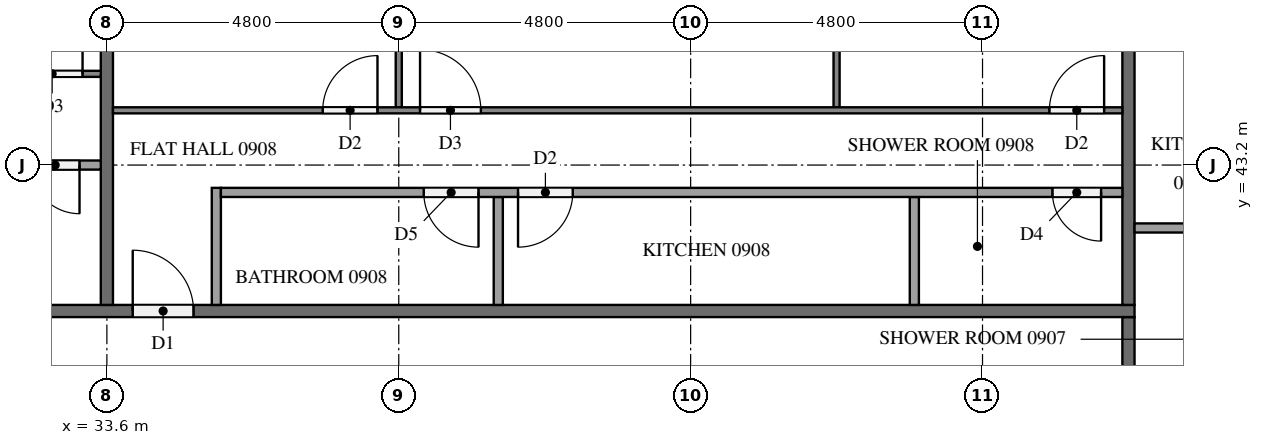
"""IFC4 building model, lengths in metres.
Left out: names, types, materials, properties, quantities, classifications, styles, units other than length and angle.
Written with IfcOpenShell. Run it as: python <this file> out.ifc"""

import sys

from ifc_helpers import new_model, si_unit, direction, frame, frame_2d, origin, place, context, subcontext, project, spatial, rectangle, extrude, element, fill, save


model = new_model("IFC4")
c1 = context("Model", 3, precision=1e-05, world=origin(), true_north=direction((0.0, 1.0)))
c2 = subcontext(c1, "Body", "Model", "MODEL_VIEW")
j1 = project(units=[si_unit("LENGTHUNIT", "METRE"), si_unit("PLANEANGLEUNIT", "RADIAN")], contexts=[c1])
p1 = place(None, origin())
s1 = spatial("IfcSite", under=j1, at=p1, CompositionType="ELEMENT")
p2 = place(p1, origin())
s2 = spatial("IfcBuilding", under=s1, at=p2, CompositionType="ELEMENT")
p3 = place(p2, frame((0.0, 0.0, 39.9)))
s3 = spatial("IfcBuildingStorey", under=s2, at=p3, CompositionType="ELEMENT", Elevation=39.9)
p4 = place(p3, frame((50.4, 40.7, 0.0), z_axis=(0.0, 0.0, 1.0), x_axis=(0.0, -1.0, 0.0)))
e1 = element("IfcWall", 1, at=p4, inside=s3, PredefinedType="PARTITIONING", context=c2, shape_type="SweptSolid", body=[
    extrude(rectangle(XDim=28.6, YDim=0.2, at=frame_2d((14.3, 0.0))), origin(), (0.0, 0.0, 1.0), 3.2),
])
p5 = place(p4, frame((17.125, 0.0, 0.0)))
e2 = element("IfcOpeningElement", 2, at=p5, cuts=e1, PredefinedType="OPENING", context=c2, shape_type="SweptSolid", body=[
    extrude(rectangle(XDim=1.0, YDim=2.1, at=frame_2d((0.5, 1.05))), frame((0.0, 0.11, 0.0), z_axis=(0.0, -1.0, 0.0), x_axis=(1.0, 0.0, 0.0)), (0.0, 0.0, 1.0), 0.22),
])
p6 = place(p4, frame((15.275, 0.0, 0.0)))
e3 = element("IfcOpeningElement", 3, at=p6, cuts=e1, PredefinedType="OPENING", context=c2, shape_type="SweptSolid", body=[
    extrude(rectangle(XDim=1.0, YDim=2.1, at=frame_2d((0.5, 1.05))), frame((0.0, 0.11, 0.0), z_axis=(0.0, -1.0, 0.0), x_axis=(1.0, 0.0, 0.0)), (0.0, 0.0, 1.0), 0.22),
])
p7 = place(p4, frame((5.675, 0.0, 0.0)))
e4 = element("IfcOpeningElement", 4, at=p7, cuts=e1, PredefinedType="OPENING", context=c2, shape_type="SweptSolid", body=[
    extrude(rectangle(XDim=1.0, YDim=2.1, at=frame_2d((0.5, 1.05))), frame((0.0, 0.11, 0.0), z_axis=(0.0, -1.0, 0.0), x_axis=(1.0, 0.0, 0.0)), (0.0, 0.0, 1.0), 0.22),
])
p8 = place(p3, frame((11.9, 40.8, 0.0), z_axis=(0.0, 0.0, 1.0), x_axis=(1.0, 0.0, 0.0)))
e5 = element("IfcWall", 5, at=p8, inside=s3, PredefinedType="PARTITIONING", context=c2, shape_type="SweptSolid", body=[
    extrude(rectangle(XDim=38.6, YDim=0.2, at=frame_2d((19.3, 0.0))), origin(), (0.0, 0.0, 1.0), 3.2),
])
p9 = place(p8, frame((22.125, 0.0, 0.0)))
e6 = element("IfcOpeningElement", 6, at=p9, cuts=e5, PredefinedType="OPENING", context=c2, shape_type="SweptSolid", body=[
    extrude(rectangle(XDim=1.0, YDim=2.1, at=frame_2d((0.5, 1.05))), frame((0.0, 0.11, 0.0), z_axis=(0.0, -1.0, 0.0), x_axis=(1.0, 0.0, 0.0)), (0.0, 0.0, 1.0), 0.22),
])
p10 = place(p8, frame((10.125, 0.0, 0.0)))
e7 = element("IfcOpeningElement", 7, at=p10, cuts=e5, PredefinedType="OPENING", context=c2, shape_type="SweptSolid", body=[
    extrude(rectangle(XDim=1.0, YDim=2.1, at=frame_2d((0.5, 1.05))), frame((0.0, 0.11, 0.0), z_axis=(0.0, -1.0, 0.0), x_axis=(1.0, 0.0, 0.0)), (0.0, 0.0, 1.0), 0.22),
])
p11 = place(p8, frame((8.275, 0.0, 0.0)))
e8 = element("IfcOpeningElement", 8, at=p11, cuts=e5, PredefinedType="OPENING", context=c2, shape_type="SweptSolid", body=[
    extrude(rectangle(XDim=1.0, YDim=2.1, at=frame_2d((0.5, 1.05))), frame((0.0, 0.11, 0.0), z_axis=(0.0, -1.0, 0.0), x_axis=(1.0, 0.0, 0.0)), (0.0, 0.0, 1.0), 0.22),
])
p12 = place(p3, frame((50.4, 40.9, 0.0), z_axis=(0.0, 0.0, 1.0), x_axis=(0.0, 1.0, 0.0)))
e9 = element("IfcWall", 9, at=p12, inside=s3, PredefinedType="PARTITIONING", context=c2, shape_type="SweptSolid", body=[
    extrude(rectangle(XDim=7.0, YDim=0.2, at=frame_2d((3.5, 0.0))), origin(), (0.0, 0.0, 1.0), 3.2),
])
p13 = place(p3, frame((33.6, 47.55, 0.0), z_axis=(0.0, 0.0, 1.0), x_axis=(0.0, -1.0, 0.0)))
e10 = element("IfcWall", 10, at=p13, inside=s3, PredefinedType="PARTITIONING", context=c2, shape_type="SweptSolid", body=[
    extrude(rectangle(XDim=6.65, YDim=0.2, at=frame_2d((3.325, 0.0))), origin(), (0.0, 0.0, 1.0), 3.2),
])
p14 = place(p3, frame((50.5, 42.165, 0.0), z_axis=(0.0, 0.0, 1.0), x_axis=(1.0, 0.0, 0.0)))
e11 = element("IfcWall", 11, at=p14, inside=s3, PredefinedType="PARTITIONING", context=c2, shape_type="SweptSolid", body=[
    extrude(rectangle(XDim=1.925, YDim=0.15, at=frame_2d((0.962, 0.0))), origin(), (0.0, 0.0, 1.0), 3.2),
])
for number, where, z_axis, x_axis in (
    (12, (38.4, 44.15, 0.0), (0.0, 0.0, 1.0), (0.0, 1.0, 0.0)),
    (13, (45.6, 44.15, 0.0), (0.0, 0.0, 1.0), (0.0, 1.0, 0.0)),
):
    element("IfcWall", number, at=place(p3, frame(where, z_axis=z_axis, x_axis=x_axis)), inside=s3, PredefinedType="PARTITIONING", context=c2, shape_type="SweptSolid", body=[
        extrude(rectangle(XDim=3.75, YDim=0.1, at=frame_2d((1.875, 0.0))), origin(), (0.0, 0.0, 1.0), 3.2),
    ])
p15 = place(p3, frame((33.7, 44.1, 0.0), z_axis=(0.0, 0.0, 1.0), x_axis=(1.0, 0.0, 0.0)))
e14 = element("IfcWall", 14, at=p15, inside=s3, PredefinedType="PARTITIONING", context=c2, shape_type="SweptSolid", body=[
    extrude(rectangle(XDim=16.6, YDim=0.1, at=frame_2d((8.3, 0.0))), origin(), (0.0, 0.0, 1.0), 3.2),
])
p16 = place(p15, frame((3.45, 0.0, 0.0)))
e15 = element("IfcOpeningElement", 15, at=p16, cuts=e14, PredefinedType="OPENING", context=c2, shape_type="SweptSolid", body=[
    extrude(rectangle(XDim=0.9, YDim=2.1, at=frame_2d((0.45, 1.05))), frame((0.0, 0.06, 0.0), z_axis=(0.0, -1.0, 0.0), x_axis=(1.0, 0.0, 0.0)), (0.0, 0.0, 1.0), 0.12),
])
p17 = place(p15, frame((5.05, 0.0, 0.0)))
e16 = element("IfcOpeningElement", 16, at=p17, cuts=e14, PredefinedType="OPENING", context=c2, shape_type="SweptSolid", body=[
    extrude(rectangle(XDim=1.0, YDim=2.1, at=frame_2d((0.5, 1.05))), frame((0.0, 0.06, 0.0), z_axis=(0.0, -1.0, 0.0), x_axis=(1.0, 0.0, 0.0)), (0.0, 0.0, 1.0), 0.12),
])
p18 = place(p15, frame((15.4, 0.0, 0.0)))
e17 = element("IfcOpeningElement", 17, at=p18, cuts=e14, PredefinedType="OPENING", context=c2, shape_type="SweptSolid", body=[
    extrude(rectangle(XDim=0.9, YDim=2.1, at=frame_2d((0.45, 1.05))), frame((0.0, 0.06, 0.0), z_axis=(0.0, -1.0, 0.0), x_axis=(1.0, 0.0, 0.0)), (0.0, 0.0, 1.0), 0.12),
])
for number, where, z_axis, x_axis in (
    (18, (40.037, 40.9, 0.0), (0.0, 0.0, 1.0), (0.0, 1.0, 0.0)),
    (19, (46.879, 40.9, 0.0), (0.0, 0.0, 1.0), (0.0, 1.0, 0.0)),
):
    element("IfcWall", number, at=place(p3, frame(where, z_axis=z_axis, x_axis=x_axis)), inside=s3, PredefinedType="PARTITIONING", context=c2, shape_type="SweptSolid", body=[
        extrude(rectangle(XDim=1.775, YDim=0.15, at=frame_2d((0.888, 0.0))), origin(), (0.0, 0.0, 1.0), 3.2),
    ])
p19 = place(p3, frame((35.4, 40.9, 0.0), z_axis=(0.0, 0.0, 1.0), x_axis=(0.0, 1.0, 0.0)))
e20 = element("IfcWall", 20, at=p19, inside=s3, PredefinedType="PARTITIONING", context=c2, shape_type="SweptSolid", body=[
    extrude(rectangle(XDim=1.925, YDim=0.15, at=frame_2d((0.962, 0.0))), origin(), (0.0, 0.0, 1.0), 3.2),
])
p20 = place(p3, frame((50.3, 42.75, 0.0), z_axis=(0.0, 0.0, 1.0), x_axis=(-1.0, 0.0, 0.0)))
e21 = element("IfcWall", 21, at=p20, inside=s3, PredefinedType="PARTITIONING", context=c2, shape_type="SweptSolid", body=[
    extrude(rectangle(XDim=14.825, YDim=0.15, at=frame_2d((7.413, 0.0))), origin(), (0.0, 0.0, 1.0), 3.2),
])
p21 = place(p20, frame((10.588, 0.0, 0.0)))
e22 = element("IfcOpeningElement", 22, at=p21, cuts=e21, PredefinedType="OPENING", context=c2, shape_type="SweptSolid", body=[
    extrude(rectangle(XDim=0.9, YDim=2.1, at=frame_2d((0.45, 1.05))), frame((0.0, 0.085, 0.0), z_axis=(0.0, -1.0, 0.0), x_axis=(1.0, 0.0, 0.0)), (0.0, 0.0, 1.0), 0.17),
])
p22 = place(p20, frame((9.039, 0.0, 0.0)))
e23 = element("IfcOpeningElement", 23, at=p22, cuts=e21, PredefinedType="OPENING", context=c2, shape_type="SweptSolid", body=[
    extrude(rectangle(XDim=0.9, YDim=2.1, at=frame_2d((0.45, 1.05))), frame((0.0, 0.085, 0.0), z_axis=(0.0, -1.0, 0.0), x_axis=(1.0, 0.0, 0.0)), (0.0, 0.0, 1.0), 0.17),
])
p23 = place(p20, frame((0.35, 0.0, 0.0)))
e24 = element("IfcOpeningElement", 24, at=p23, cuts=e21, PredefinedType="OPENING", context=c2, shape_type="SweptSolid", body=[
    extrude(rectangle(XDim=0.8, YDim=2.1, at=frame_2d((0.4, 1.05))), frame((0.0, 0.085, 0.0), z_axis=(0.0, -1.0, 0.0), x_axis=(1.0, 0.0, 0.0)), (0.0, 0.0, 1.0), 0.17),
])
p24 = place(p3, frame((21.7, 44.7, 0.0), z_axis=(0.0, 0.0, 1.0), x_axis=(1.0, 0.0, 0.0)))
e25 = element("IfcWall", 25, at=p24, inside=s3, PredefinedType="PARTITIONING", context=c2, shape_type="SweptSolid", body=[
    extrude(rectangle(XDim=11.8, YDim=0.1, at=frame_2d((5.9, 0.0))), origin(), (0.0, 0.0, 1.0), 3.2),
])
p25 = place(p24, frame((0.3, 0.0, 0.0)))
e26 = element("IfcOpeningElement", 26, at=p25, cuts=e25, PredefinedType="OPENING", context=c2, shape_type="SweptSolid", body=[
    extrude(rectangle(XDim=0.9, YDim=2.1, at=frame_2d((0.45, 1.05))), frame((0.0, 0.06, 0.0), z_axis=(0.0, -1.0, 0.0), x_axis=(1.0, 0.0, 0.0)), (0.0, 0.0, 1.0), 0.12),
])
p26 = place(p24, frame((10.5, 0.0, 0.0)))
e27 = element("IfcOpeningElement", 27, at=p26, cuts=e25, PredefinedType="OPENING", context=c2, shape_type="SweptSolid", body=[
    extrude(rectangle(XDim=1.0, YDim=2.1, at=frame_2d((0.5, 1.05))), frame((0.0, 0.06, 0.0), z_axis=(0.0, -1.0, 0.0), x_axis=(1.0, 0.0, 0.0)), (0.0, 0.0, 1.0), 0.12),
])
p27 = place(p3, frame((33.5, 43.2, 0.0), z_axis=(0.0, 0.0, 1.0), x_axis=(-1.0, 0.0, 0.0)))
e28 = element("IfcWall", 28, at=p27, inside=s3, PredefinedType="PARTITIONING", context=c2, shape_type="SweptSolid", body=[
    extrude(rectangle(XDim=10.025, YDim=0.15, at=frame_2d((5.012, 0.0))), origin(), (0.0, 0.0, 1.0), 3.2),
])
p28 = place(p27, frame((8.825, 0.0, 0.0)))
e29 = element("IfcOpeningElement", 29, at=p28, cuts=e28, PredefinedType="OPENING", context=c2, shape_type="SweptSolid", body=[
    extrude(rectangle(XDim=0.9, YDim=2.1, at=frame_2d((0.45, 1.05))), frame((0.0, 0.085, 0.0), z_axis=(0.0, -1.0, 0.0), x_axis=(1.0, 0.0, 0.0)), (0.0, 0.0, 1.0), 0.17),
])
p29 = place(p27, frame((0.35, 0.0, 0.0)))
e30 = element("IfcOpeningElement", 30, at=p29, cuts=e28, PredefinedType="OPENING", context=c2, shape_type="SweptSolid", body=[
    extrude(rectangle(XDim=0.8, YDim=2.1, at=frame_2d((0.4, 1.05))), frame((0.0, 0.085, 0.0), z_axis=(0.0, -1.0, 0.0), x_axis=(1.0, 0.0, 0.0)), (0.0, 0.0, 1.0), 0.17),
])
p30 = place(p9, origin())
e31 = element("IfcDoor", 31, at=p30, inside=s3, OperationType="SINGLE_SWING_LEFT", PredefinedType="DOOR", context=c2, shape_type="SweptSolid", body=[
    extrude(rectangle(XDim=1.0, YDim=2.1, at=frame_2d((0.5, 1.05))), frame((0.0, 0.025, 0.0), z_axis=(0.0, -1.0, 0.0), x_axis=(1.0, 0.0, 0.0)), (0.0, 0.0, 1.0), 0.05),
])
fill(e6, e31)
p31 = place(p16, origin())
e32 = element("IfcDoor", 32, at=p31, inside=s3, OperationType="SINGLE_SWING_RIGHT", PredefinedType="DOOR", context=c2, shape_type="SweptSolid", body=[
    extrude(rectangle(XDim=0.9, YDim=2.1, at=frame_2d((0.45, 1.05))), frame((0.0, 0.025, 0.0), z_axis=(0.0, -1.0, 0.0), x_axis=(1.0, 0.0, 0.0)), (0.0, 0.0, 1.0), 0.05),
])
fill(e15, e32)
p32 = place(p17, origin())
e33 = element("IfcDoor", 33, at=p32, inside=s3, OperationType="SINGLE_SWING_LEFT", PredefinedType="DOOR", context=c2, shape_type="SweptSolid", body=[
    extrude(rectangle(XDim=1.0, YDim=2.1, at=frame_2d((0.5, 1.05))), frame((0.0, 0.025, 0.0), z_axis=(0.0, -1.0, 0.0), x_axis=(1.0, 0.0, 0.0)), (0.0, 0.0, 1.0), 0.05),
])
fill(e16, e33)
p33 = place(p18, origin())
e34 = element("IfcDoor", 34, at=p33, inside=s3, OperationType="SINGLE_SWING_RIGHT", PredefinedType="DOOR", context=c2, shape_type="SweptSolid", body=[
    extrude(rectangle(XDim=0.9, YDim=2.1, at=frame_2d((0.45, 1.05))), frame((0.0, 0.025, 0.0), z_axis=(0.0, -1.0, 0.0), x_axis=(1.0, 0.0, 0.0)), (0.0, 0.0, 1.0), 0.05),
])
fill(e17, e34)
p34 = place(p21, origin())
e35 = element("IfcDoor", 35, at=p34, inside=s3, OperationType="SINGLE_SWING_LEFT", PredefinedType="DOOR", context=c2, shape_type="SweptSolid", body=[
    extrude(rectangle(XDim=0.9, YDim=2.1, at=frame_2d((0.45, 1.05))), frame((0.0, 0.025, 0.0), z_axis=(0.0, -1.0, 0.0), x_axis=(1.0, 0.0, 0.0)), (0.0, 0.0, 1.0), 0.05),
])
fill(e22, e35)
p35 = place(p22, origin())
e36 = element("IfcDoor", 36, at=p35, inside=s3, OperationType="SINGLE_SWING_RIGHT", PredefinedType="DOOR", context=c2, shape_type="SweptSolid", body=[
    extrude(rectangle(XDim=0.9, YDim=2.1, at=frame_2d((0.45, 1.05))), frame((0.0, 0.025, 0.0), z_axis=(0.0, -1.0, 0.0), x_axis=(1.0, 0.0, 0.0)), (0.0, 0.0, 1.0), 0.05),
])
fill(e23, e36)
p36 = place(p23, origin())
e37 = element("IfcDoor", 37, at=p36, inside=s3, OperationType="SINGLE_SWING_LEFT", PredefinedType="DOOR", context=c2, shape_type="SweptSolid", body=[
    extrude(rectangle(XDim=0.8, YDim=2.1, at=frame_2d((0.4, 1.05))), frame((0.0, 0.025, 0.0), z_axis=(0.0, -1.0, 0.0), x_axis=(1.0, 0.0, 0.0)), (0.0, 0.0, 1.0), 0.05),
])
fill(e24, e37)
p37 = place(p26, origin())
e38 = element("IfcDoor", 38, at=p37, inside=s3, OperationType="SINGLE_SWING_RIGHT", PredefinedType="DOOR", context=c2, shape_type="SweptSolid", body=[
    extrude(rectangle(XDim=1.0, YDim=2.1, at=frame_2d((0.5, 1.05))), frame((0.0, 0.025, 0.0), z_axis=(0.0, -1.0, 0.0), x_axis=(1.0, 0.0, 0.0)), (0.0, 0.0, 1.0), 0.05),
])
fill(e27, e38)
p38 = place(p29, origin())
e39 = element("IfcDoor", 39, at=p38, inside=s3, OperationType="SINGLE_SWING_LEFT", PredefinedType="DOOR", context=c2, shape_type="SweptSolid", body=[
    extrude(rectangle(XDim=0.8, YDim=2.1, at=frame_2d((0.4, 1.05))), frame((0.0, 0.025, 0.0), z_axis=(0.0, -1.0, 0.0), x_axis=(1.0, 0.0, 0.0)), (0.0, 0.0, 1.0), 0.05),
])
fill(e30, e39)
save(model, sys.argv[1])
